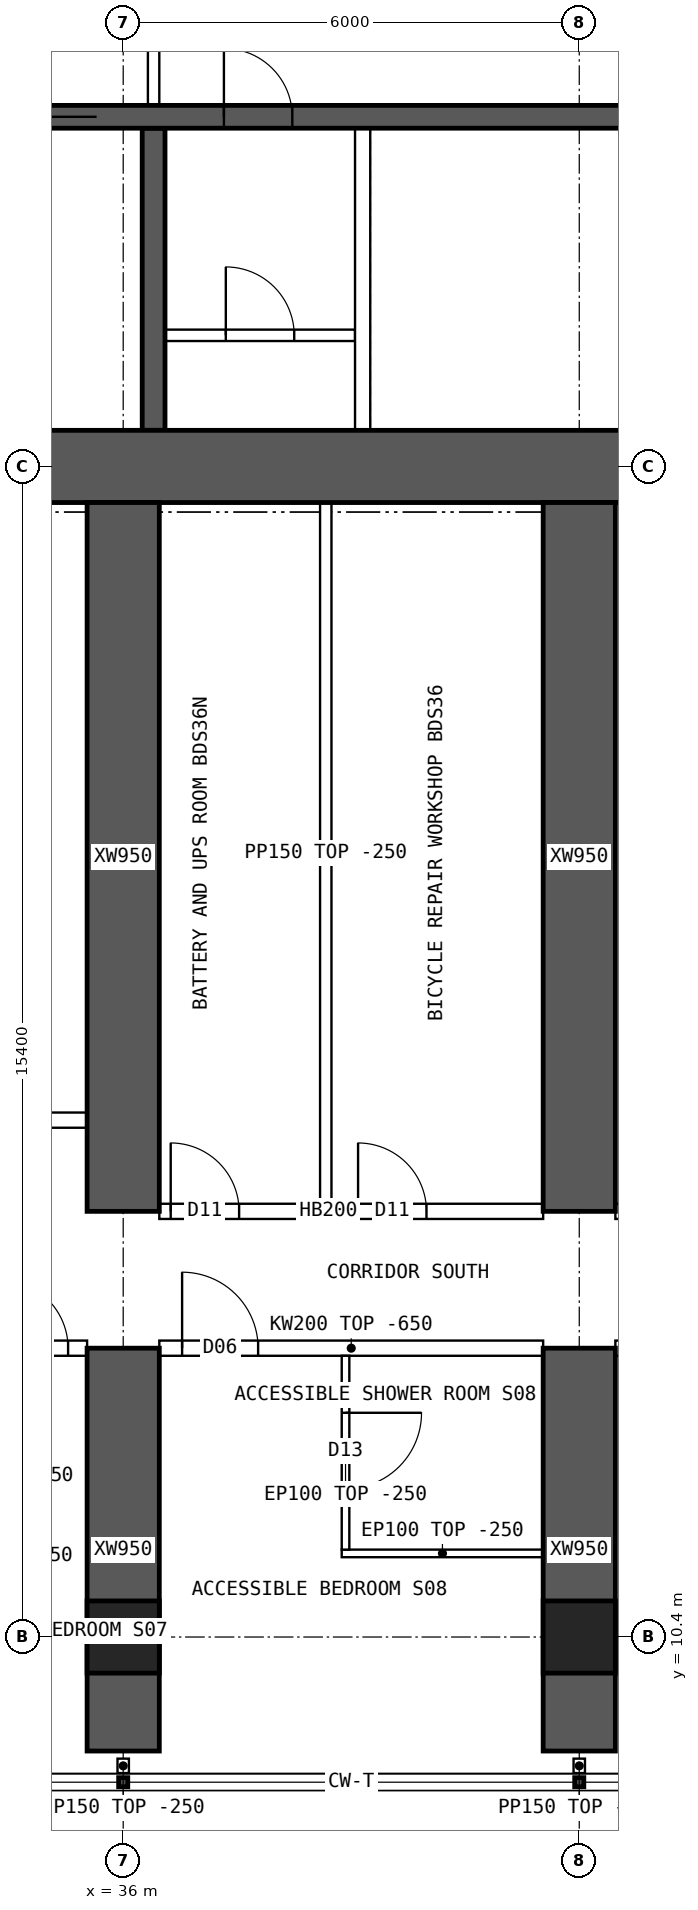
"""IFC4 building model, lengths in metres.
Left out: names, types, materials, properties, quantities, classifications, styles, units other than length and angle.
Written with IfcOpenShell. Run it as: python <this file> out.ifc"""

import sys

from ifc_helpers import new_model, si_unit, direction, frame, frame_2d, origin, origin_2d, place, context, subcontext, project, spatial, polyline, rectangle, hollow_rectangle, outline, extrude, element, fill, save


model = new_model("IFC4")
c1 = context("Model", 3, precision=1e-05, world=origin(), true_north=direction((0.0, 1.0)))
c2 = subcontext(c1, "Body", "Model", "MODEL_VIEW")
j1 = project(units=[si_unit("LENGTHUNIT", "METRE"), si_unit("PLANEANGLEUNIT", "RADIAN")], contexts=[c1])
p1 = place(None, origin())
s1 = spatial("IfcSite", under=j1, at=p1, CompositionType="ELEMENT")
p2 = place(p1, origin())
s2 = spatial("IfcBuilding", under=s1, at=p2, CompositionType="ELEMENT")
p3 = place(p2, frame((0.0, 0.0, 118.15)))
s3 = spatial("IfcBuildingStorey", under=s2, at=p3, CompositionType="ELEMENT", Elevation=118.15)
for number, where, z_axis, x_axis in (
    (1, (36.0, 10.4, 0.0), (0.0, 0.0, 1.0), (1.0, 0.0, 0.0)),
    (2, (42.0, 10.4, 0.0), (0.0, 0.0, 1.0), (1.0, 0.0, 0.0)),
):
    element("IfcColumn", number, at=place(p3, frame(where, z_axis=z_axis, x_axis=x_axis)), inside=s3, PredefinedType="COLUMN", context=c2, shape_type="SweptSolid", body=[
        extrude(hollow_rectangle(XDim=0.95, YDim=0.95, WallThickness=0.095, at=origin_2d()), origin(), (0.0, 0.0, 1.0), 3.75),
    ])
p4 = place(p3, frame((18.0, 25.8, 0.0), z_axis=(0.0, 0.0, 1.0), x_axis=(1.0, 0.0, 0.0)))
e3 = element("IfcWall", 3, at=p4, inside=s3, PredefinedType="SHEAR", context=c2, shape_type="SweptSolid", body=[
    extrude(rectangle(XDim=48.0, YDim=0.95, at=frame_2d((24.0, 0.0))), origin(), (0.0, 0.0, 1.0), 3.75),
])
p5 = place(p3, frame((18.475, 30.4, 0.0), z_axis=(0.0, 0.0, 1.0), x_axis=(1.0, 0.0, 0.0)))
e4 = element("IfcWall", 4, at=p5, inside=s3, PredefinedType="SHEAR", context=c2, shape_type="SweptSolid", body=[
    extrude(rectangle(XDim=47.05, YDim=0.3, at=frame_2d((23.525, 0.0))), origin(), (0.0, 0.0, 1.0), 3.75),
])
p6 = place(p5, frame((0.4, 0.0, 0.0)))
e5 = element("IfcOpeningElement", 5, at=p6, cuts=e4, PredefinedType="OPENING", context=c2, shape_type="SweptSolid", body=[
    extrude(rectangle(XDim=1.0, YDim=2.1, at=frame_2d((0.5, 1.05))), frame((0.0, 0.16, 0.0), z_axis=(0.0, -1.0, 0.0), x_axis=(1.0, 0.0, 0.0)), (0.0, 0.0, 1.0), 0.32),
])
p7 = place(p5, frame((45.65, 0.0, 0.0)))
e6 = element("IfcOpeningElement", 6, at=p7, cuts=e4, PredefinedType="OPENING", context=c2, shape_type="SweptSolid", body=[
    extrude(rectangle(XDim=1.0, YDim=2.1, at=frame_2d((0.5, 1.05))), frame((0.0, 0.16, 0.0), z_axis=(0.0, -1.0, 0.0), x_axis=(1.0, 0.0, 0.0)), (0.0, 0.0, 1.0), 0.32),
])
p8 = place(p5, frame((8.275, 0.0, 0.0)))
e7 = element("IfcOpeningElement", 7, at=p8, cuts=e4, PredefinedType="OPENING", context=c2, shape_type="SweptSolid", body=[
    extrude(rectangle(XDim=1.1, YDim=2.1, at=frame_2d((0.55, 1.05))), frame((0.0, 0.16, 0.0), z_axis=(0.0, -1.0, 0.0), x_axis=(1.0, 0.0, 0.0)), (0.0, 0.0, 1.0), 0.32),
])
p9 = place(p5, frame((10.875, 0.0, 0.0)))
e8 = element("IfcOpeningElement", 8, at=p9, cuts=e4, PredefinedType="OPENING", context=c2, shape_type="SweptSolid", body=[
    extrude(rectangle(XDim=1.1, YDim=2.1, at=frame_2d((0.55, 1.05))), frame((0.0, 0.16, 0.0), z_axis=(0.0, -1.0, 0.0), x_axis=(1.0, 0.0, 0.0)), (0.0, 0.0, 1.0), 0.32),
])
p10 = place(p5, frame((13.475, 0.0, 0.0)))
e9 = element("IfcOpeningElement", 9, at=p10, cuts=e4, PredefinedType="OPENING", context=c2, shape_type="SweptSolid", body=[
    extrude(rectangle(XDim=1.1, YDim=2.1, at=frame_2d((0.55, 1.05))), frame((0.0, 0.16, 0.0), z_axis=(0.0, -1.0, 0.0), x_axis=(1.0, 0.0, 0.0)), (0.0, 0.0, 1.0), 0.32),
])
p11 = place(p5, frame((16.075, 0.0, 0.0)))
e10 = element("IfcOpeningElement", 10, at=p11, cuts=e4, PredefinedType="OPENING", context=c2, shape_type="SweptSolid", body=[
    extrude(rectangle(XDim=1.1, YDim=2.1, at=frame_2d((0.55, 1.05))), frame((0.0, 0.16, 0.0), z_axis=(0.0, -1.0, 0.0), x_axis=(1.0, 0.0, 0.0)), (0.0, 0.0, 1.0), 0.32),
])
p12 = place(p5, frame((18.85, 0.0, 0.0)))
e11 = element("IfcOpeningElement", 11, at=p12, cuts=e4, PredefinedType="OPENING", context=c2, shape_type="SweptSolid", body=[
    extrude(rectangle(XDim=0.9, YDim=2.1, at=frame_2d((0.45, 1.05))), frame((0.0, 0.16, 0.0), z_axis=(0.0, -1.0, 0.0), x_axis=(1.0, 0.0, 0.0)), (0.0, 0.0, 1.0), 0.32),
])
p13 = place(p5, frame((30.142, 0.0, 0.0)))
e12 = element("IfcOpeningElement", 12, at=p13, cuts=e4, PredefinedType="OPENING", context=c2, shape_type="SweptSolid", body=[
    extrude(rectangle(XDim=1.1, YDim=2.1, at=frame_2d((0.55, 1.05))), frame((0.0, 0.16, 0.0), z_axis=(0.0, -1.0, 0.0), x_axis=(1.0, 0.0, 0.0)), (0.0, 0.0, 1.0), 0.32),
])
p14 = place(p5, frame((33.675, 0.0, 0.0)))
e13 = element("IfcOpeningElement", 13, at=p14, cuts=e4, PredefinedType="OPENING", context=c2, shape_type="SweptSolid", body=[
    extrude(rectangle(XDim=1.1, YDim=2.1, at=frame_2d((0.55, 1.05))), frame((0.0, 0.16, 0.0), z_axis=(0.0, -1.0, 0.0), x_axis=(1.0, 0.0, 0.0)), (0.0, 0.0, 1.0), 0.32),
])
p15 = place(p5, frame((37.208, 0.0, 0.0)))
e14 = element("IfcOpeningElement", 14, at=p15, cuts=e4, PredefinedType="OPENING", context=c2, shape_type="SweptSolid", body=[
    extrude(rectangle(XDim=1.1, YDim=2.1, at=frame_2d((0.55, 1.05))), frame((0.0, 0.16, 0.0), z_axis=(0.0, -1.0, 0.0), x_axis=(1.0, 0.0, 0.0)), (0.0, 0.0, 1.0), 0.32),
])
p16 = place(p3, frame((36.4, 26.275, 0.0), z_axis=(0.0, 0.0, 1.0), x_axis=(0.0, 1.0, 0.0)))
e15 = element("IfcWall", 15, at=p16, inside=s3, PredefinedType="SHEAR", context=c2, shape_type="SweptSolid", body=[
    extrude(rectangle(XDim=3.975, YDim=0.3, at=frame_2d((1.988, 0.0))), origin(), (0.0, 0.0, 1.0), 3.75),
])
p17 = place(p3, frame((36.0, 8.9, 0.0), z_axis=(0.0, 0.0, 1.0), x_axis=(0.0, 1.0, 0.0)))
e16 = element("IfcWall", 16, at=p17, inside=s3, PredefinedType="SHEAR", context=c2, shape_type="SweptSolid", body=[
    extrude(rectangle(XDim=5.3, YDim=0.95, at=frame_2d((2.65, 0.0))), origin(), (0.0, 0.0, 1.0), 3.75),
])
p18 = place(p3, frame((36.0, 16.0, 0.0), z_axis=(0.0, 0.0, 1.0), x_axis=(0.0, 1.0, 0.0)))
e17 = element("IfcWall", 17, at=p18, inside=s3, PredefinedType="SHEAR", context=c2, shape_type="SweptSolid", body=[
    extrude(rectangle(XDim=9.325, YDim=0.95, at=frame_2d((4.663, 0.0))), origin(), (0.0, 0.0, 1.0), 3.75),
])
p19 = place(p3, frame((42.0, 8.9, 0.0), z_axis=(0.0, 0.0, 1.0), x_axis=(0.0, 1.0, 0.0)))
e18 = element("IfcWall", 18, at=p19, inside=s3, PredefinedType="SHEAR", context=c2, shape_type="SweptSolid", body=[
    extrude(rectangle(XDim=5.3, YDim=0.95, at=frame_2d((2.65, 0.0))), origin(), (0.0, 0.0, 1.0), 3.75),
])
p20 = place(p3, frame((42.0, 16.0, 0.0), z_axis=(0.0, 0.0, 1.0), x_axis=(0.0, 1.0, 0.0)))
e19 = element("IfcWall", 19, at=p20, inside=s3, PredefinedType="SHEAR", context=c2, shape_type="SweptSolid", body=[
    extrude(rectangle(XDim=9.325, YDim=0.95, at=frame_2d((4.663, 0.0))), origin(), (0.0, 0.0, 1.0), 3.75),
])
p21 = place(p3, frame((36.4, 30.55, 0.0), z_axis=(0.0, 0.0, 1.0), x_axis=(0.0, 1.0, 0.0)))
e20 = element("IfcWall", 20, at=p21, inside=s3, PredefinedType="SOLIDWALL", context=c2, shape_type="SweptSolid", body=[
    extrude(rectangle(XDim=3.9, YDim=0.15, at=frame_2d((1.95, 0.0))), origin(), (0.0, 0.0, 1.0), 3.5),
])
p22 = place(p21, frame((1.15, 0.0, 0.0)))
e21 = element("IfcOpeningElement", 21, at=p22, cuts=e20, PredefinedType="OPENING", context=c2, shape_type="SweptSolid", body=[
    extrude(rectangle(XDim=1.6, YDim=2.1, at=frame_2d((0.8, 1.05))), frame((0.0, 0.085, 0.0), z_axis=(0.0, -1.0, 0.0), x_axis=(1.0, 0.0, 0.0)), (0.0, 0.0, 1.0), 0.17),
])
p23 = place(p3, frame((36.55, 27.525, 0.0), z_axis=(0.0, 0.0, 1.0), x_axis=(1.0, 0.0, 0.0)))
e22 = element("IfcWall", 22, at=p23, inside=s3, PredefinedType="SOLIDWALL", context=c2, shape_type="SweptSolid", body=[
    extrude(rectangle(XDim=2.5, YDim=0.15, at=frame_2d((1.25, 0.0))), origin(), (0.0, 0.0, 1.0), 3.5),
])
p24 = place(p23, frame((0.8, 0.0, 0.0)))
e23 = element("IfcOpeningElement", 23, at=p24, cuts=e22, PredefinedType="OPENING", context=c2, shape_type="SweptSolid", body=[
    extrude(rectangle(XDim=0.9, YDim=2.1, at=frame_2d((0.45, 1.05))), frame((0.0, 0.085, 0.0), z_axis=(0.0, -1.0, 0.0), x_axis=(1.0, 0.0, 0.0)), (0.0, 0.0, 1.0), 0.17),
])
p25 = place(p3, frame((39.15, 26.275, 0.0), z_axis=(0.0, 0.0, 1.0), x_axis=(0.0, 1.0, 0.0)))
e24 = element("IfcWall", 24, at=p25, inside=s3, PredefinedType="SOLIDWALL", context=c2, shape_type="SweptSolid", body=[
    extrude(rectangle(XDim=3.975, YDim=0.2, at=frame_2d((1.988, 0.0))), origin(), (0.0, 0.0, 1.0), 3.5),
])
p26 = place(p3, frame((30.475, 14.2, 0.0), z_axis=(0.0, 0.0, 1.0), x_axis=(1.0, 0.0, 0.0)))
e25 = element("IfcWall", 25, at=p26, inside=s3, PredefinedType="SOLIDWALL", context=c2, shape_type="SweptSolid", body=[
    extrude(outline(polyline([(0.0, 0.0), (5.05, 0.0), (5.05, 3.1), (0.0, 3.1), (0.0, 0.0)])), frame((0.0, 0.1, 0.0), z_axis=(0.0, -1.0, 0.0), x_axis=(1.0, 0.0, 0.0)), (0.0, 0.0, 1.0), 0.2),
])
p27 = place(p26, frame((0.1, 0.0, 0.0)))
e26 = element("IfcOpeningElement", 26, at=p27, cuts=e25, PredefinedType="OPENING", context=c2, shape_type="SweptSolid", body=[
    extrude(rectangle(XDim=0.9, YDim=2.1, at=frame_2d((0.45, 1.05))), frame((0.0, 0.11, 0.0), z_axis=(0.0, -1.0, 0.0), x_axis=(1.0, 0.0, 0.0)), (0.0, 0.0, 1.0), 0.22),
])
p28 = place(p26, frame((3.9, 0.0, 0.0)))
e27 = element("IfcOpeningElement", 27, at=p28, cuts=e25, PredefinedType="OPENING", context=c2, shape_type="SweptSolid", body=[
    extrude(rectangle(XDim=0.9, YDim=2.1, at=frame_2d((0.45, 1.05))), frame((0.0, 0.11, 0.0), z_axis=(0.0, -1.0, 0.0), x_axis=(1.0, 0.0, 0.0)), (0.0, 0.0, 1.0), 0.22),
])
p29 = place(p3, frame((36.475, 14.2, 0.0), z_axis=(0.0, 0.0, 1.0), x_axis=(1.0, 0.0, 0.0)))
e28 = element("IfcWall", 28, at=p29, inside=s3, PredefinedType="SOLIDWALL", context=c2, shape_type="SweptSolid", body=[
    extrude(outline(polyline([(0.0, 0.0), (5.05, 0.0), (5.05, 3.1), (0.0, 3.1), (0.0, 0.0)])), frame((0.0, 0.1, 0.0), z_axis=(0.0, -1.0, 0.0), x_axis=(1.0, 0.0, 0.0)), (0.0, 0.0, 1.0), 0.2),
])
p30 = place(p29, frame((0.3, 0.0, 0.0)))
e29 = element("IfcOpeningElement", 29, at=p30, cuts=e28, PredefinedType="OPENING", context=c2, shape_type="SweptSolid", body=[
    extrude(rectangle(XDim=1.0, YDim=2.1, at=frame_2d((0.5, 1.05))), frame((0.0, 0.11, 0.0), z_axis=(0.0, -1.0, 0.0), x_axis=(1.0, 0.0, 0.0)), (0.0, 0.0, 1.0), 0.22),
])
p31 = place(p3, frame((36.475, 16.0, 0.0), z_axis=(0.0, 0.0, 1.0), x_axis=(1.0, 0.0, 0.0)))
e30 = element("IfcWall", 30, at=p31, inside=s3, PredefinedType="SOLIDWALL", context=c2, shape_type="SweptSolid", body=[
    extrude(rectangle(XDim=5.05, YDim=0.2, at=frame_2d((2.525, 0.0))), origin(), (0.0, 0.0, 1.0), 3.5),
])
p32 = place(p31, frame((0.15, 0.0, 0.0)))
e31 = element("IfcOpeningElement", 31, at=p32, cuts=e30, PredefinedType="OPENING", context=c2, shape_type="SweptSolid", body=[
    extrude(rectangle(XDim=0.9, YDim=2.1, at=frame_2d((0.45, 1.05))), frame((0.0, 0.11, 0.0), z_axis=(0.0, -1.0, 0.0), x_axis=(1.0, 0.0, 0.0)), (0.0, 0.0, 1.0), 0.22),
])
p33 = place(p31, frame((2.615, 0.0, 0.0)))
e32 = element("IfcOpeningElement", 32, at=p33, cuts=e30, PredefinedType="OPENING", context=c2, shape_type="SweptSolid", body=[
    extrude(rectangle(XDim=0.9, YDim=2.1, at=frame_2d((0.45, 1.05))), frame((0.0, 0.11, 0.0), z_axis=(0.0, -1.0, 0.0), x_axis=(1.0, 0.0, 0.0)), (0.0, 0.0, 1.0), 0.22),
])
p34 = place(p3, frame((42.475, 14.2, 0.0), z_axis=(0.0, 0.0, 1.0), x_axis=(1.0, 0.0, 0.0)))
e33 = element("IfcWall", 33, at=p34, inside=s3, PredefinedType="SOLIDWALL", context=c2, shape_type="SweptSolid", body=[
    extrude(outline(polyline([(0.0, 0.0), (5.05, 0.0), (5.05, 3.1), (0.0, 3.1), (0.0, 0.0)])), frame((0.0, 0.1, 0.0), z_axis=(0.0, -1.0, 0.0), x_axis=(1.0, 0.0, 0.0)), (0.0, 0.0, 1.0), 0.2),
])
p35 = place(p34, frame((0.6, 0.0, 0.0)))
e34 = element("IfcOpeningElement", 34, at=p35, cuts=e33, PredefinedType="OPENING", context=c2, shape_type="SweptSolid", body=[
    extrude(rectangle(XDim=1.0, YDim=2.1, at=frame_2d((0.5, 1.05))), frame((0.0, 0.11, 0.0), z_axis=(0.0, -1.0, 0.0), x_axis=(1.0, 0.0, 0.0)), (0.0, 0.0, 1.0), 0.22),
])
p36 = place(p3, frame((42.475, 16.0, 0.0), z_axis=(0.0, 0.0, 1.0), x_axis=(1.0, 0.0, 0.0)))
e35 = element("IfcWall", 35, at=p36, inside=s3, PredefinedType="SOLIDWALL", context=c2, shape_type="SweptSolid", body=[
    extrude(rectangle(XDim=5.05, YDim=0.2, at=frame_2d((2.525, 0.0))), origin(), (0.0, 0.0, 1.0), 3.5),
])
p37 = place(p36, frame((0.8, 0.0, 0.0)))
e36 = element("IfcOpeningElement", 36, at=p37, cuts=e35, PredefinedType="OPENING", context=c2, shape_type="SweptSolid", body=[
    extrude(rectangle(XDim=1.0, YDim=2.1, at=frame_2d((0.5, 1.05))), frame((0.0, 0.11, 0.0), z_axis=(0.0, -1.0, 0.0), x_axis=(1.0, 0.0, 0.0)), (0.0, 0.0, 1.0), 0.22),
])
p38 = place(p3, frame((38.875, 11.5, 0.0), z_axis=(0.0, 0.0, 1.0), x_axis=(1.0, 0.0, 0.0)))
e37 = element("IfcWall", 37, at=p38, inside=s3, PredefinedType="PARTITIONING", context=c2, shape_type="SweptSolid", body=[
    extrude(rectangle(XDim=2.65, YDim=0.1, at=frame_2d((1.325, 0.0))), origin(), (0.0, 0.0, 1.0), 3.5),
])
p39 = place(p3, frame((38.925, 11.55, 0.0), z_axis=(0.0, 0.0, 1.0), x_axis=(0.0, 1.0, 0.0)))
e38 = element("IfcWall", 38, at=p39, inside=s3, PredefinedType="PARTITIONING", context=c2, shape_type="SweptSolid", body=[
    extrude(outline(polyline([(0.0, 0.0), (2.55, 0.0), (2.55, 3.1), (2.502, 3.1), (2.5, 3.5), (0.0, 3.5), (0.0, 0.0)])), frame((0.0, 0.05, 0.0), z_axis=(0.0, -1.0, 0.0), x_axis=(1.0, 0.0, 0.0)), (0.0, 0.0, 1.0), 0.1),
])
p40 = place(p39, frame((0.8, 0.0, 0.0)))
e39 = element("IfcOpeningElement", 39, at=p40, cuts=e38, PredefinedType="OPENING", context=c2, shape_type="SweptSolid", body=[
    extrude(rectangle(XDim=1.0, YDim=2.1, at=frame_2d((0.5, 1.05))), frame((0.0, 0.06, 0.0), z_axis=(0.0, -1.0, 0.0), x_axis=(1.0, 0.0, 0.0)), (0.0, 0.0, 1.0), 0.12),
])
p41 = place(p3, frame((30.475, 17.2, 0.0), z_axis=(0.0, 0.0, 1.0), x_axis=(1.0, 0.0, 0.0)))
e40 = element("IfcWall", 40, at=p41, inside=s3, PredefinedType="SOLIDWALL", context=c2, shape_type="SweptSolid", body=[
    extrude(rectangle(XDim=5.05, YDim=0.2, at=frame_2d((2.525, 0.0))), origin(), (0.0, 0.0, 1.0), 3.5),
])
p42 = place(p41, frame((0.8, 0.0, 0.0)))
e41 = element("IfcOpeningElement", 41, at=p42, cuts=e40, PredefinedType="OPENING", context=c2, shape_type="SweptSolid", body=[
    extrude(rectangle(XDim=1.0, YDim=2.1, at=frame_2d((0.5, 1.05))), frame((0.0, 0.11, 0.0), z_axis=(0.0, -1.0, 0.0), x_axis=(1.0, 0.0, 0.0)), (0.0, 0.0, 1.0), 0.22),
])
p43 = place(p3, frame((38.665, 16.1, 0.0), z_axis=(0.0, 0.0, 1.0), x_axis=(0.0, 1.0, 0.0)))
e42 = element("IfcWall", 42, at=p43, inside=s3, PredefinedType="PARTITIONING", context=c2, shape_type="SweptSolid", body=[
    extrude(rectangle(XDim=9.225, YDim=0.15, at=frame_2d((4.612, 0.0))), origin(), (0.0, 0.0, 1.0), 3.5),
])
for number, where, z_axis, x_axis in (
    (43, (36.0, 8.8, 0.0), (0.0, 0.0, 1.0), (0.0, -1.0, 0.0)),
    (44, (42.0, 8.8, 0.0), (0.0, 0.0, 1.0), (0.0, -1.0, 0.0)),
):
    element("IfcWall", number, at=place(p3, frame(where, z_axis=z_axis, x_axis=x_axis)), inside=s3, PredefinedType="PARTITIONING", context=c2, shape_type="SweptSolid", body=[
        extrude(rectangle(XDim=0.19, YDim=0.15, at=frame_2d((0.095, 0.0))), origin(), (0.0, 0.0, 1.0), 3.5),
    ])
p44 = place(p11, origin())
e45 = element("IfcDoor", 45, at=p44, inside=s3, OperationType="DOUBLE_DOOR_SLIDING", PredefinedType="DOOR", context=c2, shape_type="SweptSolid", body=[
    extrude(rectangle(XDim=1.1, YDim=2.1, at=frame_2d((0.55, 1.05))), frame((0.0, 0.025, 0.0), z_axis=(0.0, -1.0, 0.0), x_axis=(1.0, 0.0, 0.0)), (0.0, 0.0, 1.0), 0.05),
])
fill(e10, e45)
p45 = place(p24, origin())
e46 = element("IfcDoor", 46, at=p45, inside=s3, OperationType="SINGLE_SWING_LEFT", PredefinedType="DOOR", context=c2, shape_type="SweptSolid", body=[
    extrude(rectangle(XDim=0.9, YDim=2.1, at=frame_2d((0.45, 1.05))), frame((0.0, 0.025, 0.0), z_axis=(0.0, -1.0, 0.0), x_axis=(1.0, 0.0, 0.0)), (0.0, 0.0, 1.0), 0.05),
])
fill(e23, e46)
p46 = place(p12, origin())
e47 = element("IfcDoor", 47, at=p46, inside=s3, OperationType="SINGLE_SWING_LEFT", PredefinedType="DOOR", context=c2, shape_type="SweptSolid", body=[
    extrude(rectangle(XDim=0.9, YDim=2.1, at=frame_2d((0.45, 1.05))), frame((0.0, 0.025, 0.0), z_axis=(0.0, -1.0, 0.0), x_axis=(1.0, 0.0, 0.0)), (0.0, 0.0, 1.0), 0.05),
])
fill(e11, e47)
p47 = place(p28, origin())
e48 = element("IfcDoor", 48, at=p47, inside=s3, OperationType="SINGLE_SWING_LEFT", PredefinedType="DOOR", context=c2, shape_type="SweptSolid", body=[
    extrude(rectangle(XDim=0.9, YDim=2.1, at=frame_2d((0.45, 1.05))), frame((0.0, 0.025, 0.0), z_axis=(0.0, -1.0, 0.0), x_axis=(1.0, 0.0, 0.0)), (0.0, 0.0, 1.0), 0.05),
])
fill(e27, e48)
p48 = place(p40, origin())
e49 = element("IfcDoor", 49, at=p48, inside=s3, OperationType="SINGLE_SWING_RIGHT", PredefinedType="DOOR", context=c2, shape_type="SweptSolid", body=[
    extrude(rectangle(XDim=1.0, YDim=2.1, at=frame_2d((0.5, 1.05))), frame((0.0, 0.025, 0.0), z_axis=(0.0, -1.0, 0.0), x_axis=(1.0, 0.0, 0.0)), (0.0, 0.0, 1.0), 0.05),
])
fill(e39, e49)
p49 = place(p30, origin())
e50 = element("IfcDoor", 50, at=p49, inside=s3, OperationType="SINGLE_SWING_LEFT", PredefinedType="DOOR", context=c2, shape_type="SweptSolid", body=[
    extrude(rectangle(XDim=1.0, YDim=2.1, at=frame_2d((0.5, 1.05))), frame((0.0, 0.025, 0.0), z_axis=(0.0, -1.0, 0.0), x_axis=(1.0, 0.0, 0.0)), (0.0, 0.0, 1.0), 0.05),
])
fill(e29, e50)
p50 = place(p32, origin())
e51 = element("IfcDoor", 51, at=p50, inside=s3, OperationType="SINGLE_SWING_LEFT", PredefinedType="DOOR", context=c2, shape_type="SweptSolid", body=[
    extrude(rectangle(XDim=0.9, YDim=2.1, at=frame_2d((0.45, 1.05))), frame((0.0, 0.025, 0.0), z_axis=(0.0, -1.0, 0.0), x_axis=(1.0, 0.0, 0.0)), (0.0, 0.0, 1.0), 0.05),
])
fill(e31, e51)
p51 = place(p33, origin())
e52 = element("IfcDoor", 52, at=p51, inside=s3, OperationType="SINGLE_SWING_LEFT", PredefinedType="DOOR", context=c2, shape_type="SweptSolid", body=[
    extrude(rectangle(XDim=0.9, YDim=2.1, at=frame_2d((0.45, 1.05))), frame((0.0, 0.025, 0.0), z_axis=(0.0, -1.0, 0.0), x_axis=(1.0, 0.0, 0.0)), (0.0, 0.0, 1.0), 0.05),
])
fill(e32, e52)
save(model, sys.argv[1])
